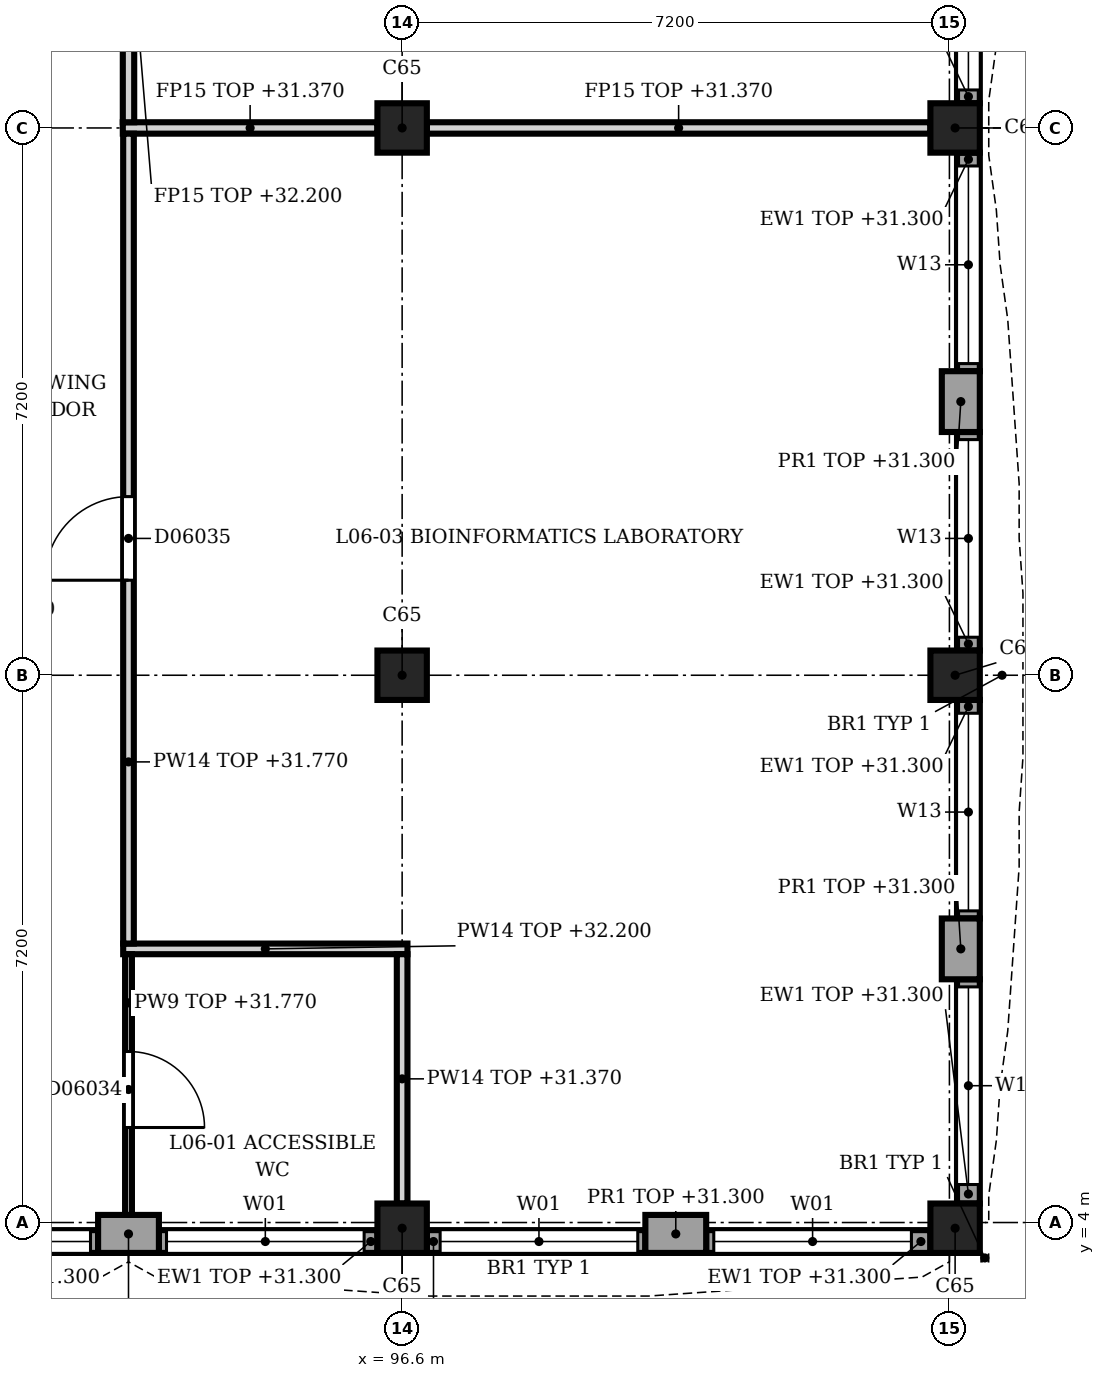
"""IFC4 building model, lengths in metres.
Left out: names, types, materials, properties, quantities, classifications, styles, units other than length and angle.
Written with IfcOpenShell. Run it as: python <this file> out.ifc"""

import sys

from ifc_helpers import new_model, si_unit, direction, frame, frame_2d, origin, origin_2d, place, context, subcontext, project, spatial, rectangle, extrude, element, fill, save


model = new_model("IFC4")
c1 = context("Model", 3, precision=1e-05, world=origin(), true_north=direction((0.0, 1.0)))
c2 = subcontext(c1, "Body", "Model", "MODEL_VIEW")
j1 = project(units=[si_unit("LENGTHUNIT", "METRE"), si_unit("PLANEANGLEUNIT", "RADIAN")], contexts=[c1])
p1 = place(None, origin())
s1 = spatial("IfcSite", under=j1, at=p1, CompositionType="ELEMENT")
p2 = place(p1, origin())
s2 = spatial("IfcBuilding", under=s1, at=p2, CompositionType="ELEMENT")
p3 = place(p2, frame((0.0, 0.0, 27.9)))
s3 = spatial("IfcBuildingStorey", under=s2, at=p3, CompositionType="ELEMENT", Elevation=27.9)
for number, where, z_axis, x_axis in (
    (1, (96.6, 3.925, 0.0), (0.0, 0.0, 1.0), (1.0, 0.0, 0.0)),
    (2, (96.6, 11.2, 0.0), (0.0, 0.0, 1.0), (1.0, 0.0, 0.0)),
    (3, (96.6, 18.4, 0.0), (0.0, 0.0, 1.0), (1.0, 0.0, 0.0)),
    (4, (103.875, 3.925, 0.0), (0.0, 0.0, 1.0), (1.0, 0.0, 0.0)),
    (5, (103.875, 11.2, 0.0), (0.0, 0.0, 1.0), (1.0, 0.0, 0.0)),
    (6, (103.875, 18.4, 0.0), (0.0, 0.0, 1.0), (1.0, 0.0, 0.0)),
):
    element("IfcColumn", number, at=place(p3, frame(where, z_axis=z_axis, x_axis=x_axis)), inside=s3, PredefinedType="COLUMN", context=c2, shape_type="SweptSolid", body=[
        extrude(rectangle(XDim=0.65, YDim=0.65, at=origin_2d()), origin(), (0.0, 0.0, 1.0), 4.5),
    ])
for number, where, z_axis, x_axis in (
    (7, (103.95, 15.2, 0.0), (0.0, 0.0, 1.0), (0.0, -1.0, 0.0)),
    (8, (103.95, 8.0, 0.0), (0.0, 0.0, 1.0), (0.0, -1.0, 0.0)),
):
    element("IfcWall", number, at=place(p3, frame(where, z_axis=z_axis, x_axis=x_axis)), inside=s3, PredefinedType="SOLIDWALL", context=c2, shape_type="SweptSolid", body=[
        extrude(rectangle(XDim=0.8, YDim=0.5, at=frame_2d((0.4, 0.0))), origin(), (0.0, 0.0, 1.0), 3.4),
    ])
p4 = place(p3, frame((104.05, 21.6, 0.0), z_axis=(0.0, 0.0, 1.0), x_axis=(0.0, -1.0, 0.0)))
e9 = element("IfcWall", 9, at=p4, inside=s3, PredefinedType="SOLIDWALL", context=c2, shape_type="SweptSolid", body=[
    extrude(rectangle(XDim=2.875, YDim=0.3, at=frame_2d((1.438, 0.0))), origin(), (0.0, 0.0, 1.0), 3.4),
])
p5 = place(p4, frame((0.1, 0.0, 0.9)))
e10 = element("IfcOpeningElement", 10, at=p5, cuts=e9, PredefinedType="OPENING", context=c2, shape_type="SweptSolid", body=[
    extrude(rectangle(XDim=2.6, YDim=2.2, at=frame_2d((1.3, 1.1))), frame((0.0, 0.16, 0.0), z_axis=(0.0, -1.0, 0.0), x_axis=(1.0, 0.0, 0.0)), (0.0, 0.0, 1.0), 0.32),
])
p6 = place(p3, frame((104.05, 18.075, 0.0), z_axis=(0.0, 0.0, 1.0), x_axis=(0.0, -1.0, 0.0)))
e11 = element("IfcWall", 11, at=p6, inside=s3, PredefinedType="SOLIDWALL", context=c2, shape_type="SweptSolid", body=[
    extrude(rectangle(XDim=2.875, YDim=0.3, at=frame_2d((1.438, 0.0))), origin(), (0.0, 0.0, 1.0), 3.4),
])
p7 = place(p6, frame((0.175, 0.0, 0.9)))
e12 = element("IfcOpeningElement", 12, at=p7, cuts=e11, PredefinedType="OPENING", context=c2, shape_type="SweptSolid", body=[
    extrude(rectangle(XDim=2.6, YDim=2.2, at=frame_2d((1.3, 1.1))), frame((0.0, 0.16, 0.0), z_axis=(0.0, -1.0, 0.0), x_axis=(1.0, 0.0, 0.0)), (0.0, 0.0, 1.0), 0.32),
])
p8 = place(p3, frame((104.05, 14.4, 0.0), z_axis=(0.0, 0.0, 1.0), x_axis=(0.0, -1.0, 0.0)))
e13 = element("IfcWall", 13, at=p8, inside=s3, PredefinedType="SOLIDWALL", context=c2, shape_type="SweptSolid", body=[
    extrude(rectangle(XDim=2.875, YDim=0.3, at=frame_2d((1.438, 0.0))), origin(), (0.0, 0.0, 1.0), 3.4),
])
p9 = place(p8, frame((0.1, 0.0, 0.9)))
e14 = element("IfcOpeningElement", 14, at=p9, cuts=e13, PredefinedType="OPENING", context=c2, shape_type="SweptSolid", body=[
    extrude(rectangle(XDim=2.6, YDim=2.2, at=frame_2d((1.3, 1.1))), frame((0.0, 0.16, 0.0), z_axis=(0.0, -1.0, 0.0), x_axis=(1.0, 0.0, 0.0)), (0.0, 0.0, 1.0), 0.32),
])
p10 = place(p3, frame((104.05, 10.875, 0.0), z_axis=(0.0, 0.0, 1.0), x_axis=(0.0, -1.0, 0.0)))
e15 = element("IfcWall", 15, at=p10, inside=s3, PredefinedType="SOLIDWALL", context=c2, shape_type="SweptSolid", body=[
    extrude(rectangle(XDim=2.875, YDim=0.3, at=frame_2d((1.438, 0.0))), origin(), (0.0, 0.0, 1.0), 3.4),
])
p11 = place(p10, frame((0.175, 0.0, 0.9)))
e16 = element("IfcOpeningElement", 16, at=p11, cuts=e15, PredefinedType="OPENING", context=c2, shape_type="SweptSolid", body=[
    extrude(rectangle(XDim=2.6, YDim=2.2, at=frame_2d((1.3, 1.1))), frame((0.0, 0.16, 0.0), z_axis=(0.0, -1.0, 0.0), x_axis=(1.0, 0.0, 0.0)), (0.0, 0.0, 1.0), 0.32),
])
p12 = place(p3, frame((104.05, 7.2, 0.0), z_axis=(0.0, 0.0, 1.0), x_axis=(0.0, -1.0, 0.0)))
e17 = element("IfcWall", 17, at=p12, inside=s3, PredefinedType="SOLIDWALL", context=c2, shape_type="SweptSolid", body=[
    extrude(rectangle(XDim=2.95, YDim=0.3, at=frame_2d((1.475, 0.0))), origin(), (0.0, 0.0, 1.0), 3.4),
])
p13 = place(p12, frame((0.1, 0.0, 0.9)))
e18 = element("IfcOpeningElement", 18, at=p13, cuts=e17, PredefinedType="OPENING", context=c2, shape_type="SweptSolid", body=[
    extrude(rectangle(XDim=2.6, YDim=2.2, at=frame_2d((1.3, 1.1))), frame((0.0, 0.16, 0.0), z_axis=(0.0, -1.0, 0.0), x_axis=(1.0, 0.0, 0.0)), (0.0, 0.0, 1.0), 0.32),
])
p14 = place(p3, frame((100.6, 3.85, 0.0), z_axis=(0.0, 0.0, 1.0), x_axis=(-1.0, 0.0, 0.0)))
e19 = element("IfcWall", 19, at=p14, inside=s3, PredefinedType="SOLIDWALL", context=c2, shape_type="SweptSolid", body=[
    extrude(rectangle(XDim=0.8, YDim=0.5, at=frame_2d((0.4, 0.0))), origin(), (0.0, 0.0, 1.0), 3.4),
])
p15 = place(p3, frame((93.4, 3.85, 0.0), z_axis=(0.0, 0.0, 1.0), x_axis=(-1.0, 0.0, 0.0)))
e20 = element("IfcWall", 20, at=p15, inside=s3, PredefinedType="SOLIDWALL", context=c2, shape_type="SweptSolid", body=[
    extrude(rectangle(XDim=0.8, YDim=0.5, at=frame_2d((0.4, 0.0))), origin(), (0.0, 0.0, 1.0), 3.4),
])
p16 = place(p3, frame((103.55, 3.75, 0.0), z_axis=(0.0, 0.0, 1.0), x_axis=(-1.0, 0.0, 0.0)))
e21 = element("IfcWall", 21, at=p16, inside=s3, PredefinedType="SOLIDWALL", context=c2, shape_type="SweptSolid", body=[
    extrude(rectangle(XDim=2.95, YDim=0.3, at=frame_2d((1.475, 0.0))), origin(), (0.0, 0.0, 1.0), 3.4),
])
p17 = place(p16, frame((0.25, 0.0, 0.9)))
e22 = element("IfcOpeningElement", 22, at=p17, cuts=e21, PredefinedType="OPENING", context=c2, shape_type="SweptSolid", body=[
    extrude(rectangle(XDim=2.6, YDim=2.4, at=frame_2d((1.3, 1.2))), frame((0.0, 0.16, 0.0), z_axis=(0.0, -1.0, 0.0), x_axis=(1.0, 0.0, 0.0)), (0.0, 0.0, 1.0), 0.32),
])
p18 = place(p3, frame((99.8, 3.75, 0.0), z_axis=(0.0, 0.0, 1.0), x_axis=(-1.0, 0.0, 0.0)))
e23 = element("IfcWall", 23, at=p18, inside=s3, PredefinedType="SOLIDWALL", context=c2, shape_type="SweptSolid", body=[
    extrude(rectangle(XDim=2.875, YDim=0.3, at=frame_2d((1.438, 0.0))), origin(), (0.0, 0.0, 1.0), 3.4),
])
p19 = place(p18, frame((0.1, 0.0, 0.9)))
e24 = element("IfcOpeningElement", 24, at=p19, cuts=e23, PredefinedType="OPENING", context=c2, shape_type="SweptSolid", body=[
    extrude(rectangle(XDim=2.6, YDim=2.4, at=frame_2d((1.3, 1.2))), frame((0.0, 0.16, 0.0), z_axis=(0.0, -1.0, 0.0), x_axis=(1.0, 0.0, 0.0)), (0.0, 0.0, 1.0), 0.32),
])
p20 = place(p3, frame((96.275, 3.75, 0.0), z_axis=(0.0, 0.0, 1.0), x_axis=(-1.0, 0.0, 0.0)))
e25 = element("IfcWall", 25, at=p20, inside=s3, PredefinedType="SOLIDWALL", context=c2, shape_type="SweptSolid", body=[
    extrude(rectangle(XDim=2.875, YDim=0.3, at=frame_2d((1.438, 0.0))), origin(), (0.0, 0.0, 1.0), 3.4),
])
p21 = place(p20, frame((0.175, 0.0, 0.9)))
e26 = element("IfcOpeningElement", 26, at=p21, cuts=e25, PredefinedType="OPENING", context=c2, shape_type="SweptSolid", body=[
    extrude(rectangle(XDim=2.6, YDim=2.4, at=frame_2d((1.3, 1.2))), frame((0.0, 0.16, 0.0), z_axis=(0.0, -1.0, 0.0), x_axis=(1.0, 0.0, 0.0)), (0.0, 0.0, 1.0), 0.32),
])
p22 = place(p3, frame((92.6, 3.75, 0.0), z_axis=(0.0, 0.0, 1.0), x_axis=(-1.0, 0.0, 0.0)))
e27 = element("IfcWall", 27, at=p22, inside=s3, PredefinedType="SOLIDWALL", context=c2, shape_type="SweptSolid", body=[
    extrude(rectangle(XDim=2.875, YDim=0.3, at=frame_2d((1.438, 0.0))), origin(), (0.0, 0.0, 1.0), 3.4),
])
p23 = place(p22, frame((0.1, 0.0, 0.9)))
e28 = element("IfcOpeningElement", 28, at=p23, cuts=e27, PredefinedType="OPENING", context=c2, shape_type="SweptSolid", body=[
    extrude(rectangle(XDim=2.6, YDim=2.4, at=frame_2d((1.3, 1.2))), frame((0.0, 0.16, 0.0), z_axis=(0.0, -1.0, 0.0), x_axis=(1.0, 0.0, 0.0)), (0.0, 0.0, 1.0), 0.32),
])
p24 = place(p3, frame((92.93, 7.6, 0.0), z_axis=(0.0, 0.0, 1.0), x_axis=(1.0, 0.0, 0.0)))
e29 = element("IfcWall", 29, at=p24, inside=s3, PredefinedType="PARTITIONING", context=c2, shape_type="SweptSolid", body=[
    extrude(rectangle(XDim=3.74, YDim=0.14, at=frame_2d((1.87, 0.0))), origin(), (0.0, 0.0, 1.0), 4.3),
])
p25 = place(p3, frame((92.925, 18.4, 0.0), z_axis=(0.0, 0.0, 1.0), x_axis=(1.0, 0.0, 0.0)))
e30 = element("IfcWall", 30, at=p25, inside=s3, PredefinedType="PARTITIONING", context=c2, shape_type="SweptSolid", body=[
    extrude(rectangle(XDim=3.35, YDim=0.15, at=frame_2d((1.675, 0.0))), origin(), (0.0, 0.0, 1.0), 3.47),
])
p26 = place(p3, frame((96.925, 18.4, 0.0), z_axis=(0.0, 0.0, 1.0), x_axis=(1.0, 0.0, 0.0)))
e31 = element("IfcWall", 31, at=p26, inside=s3, PredefinedType="PARTITIONING", context=c2, shape_type="SweptSolid", body=[
    extrude(rectangle(XDim=6.625, YDim=0.15, at=frame_2d((3.312, 0.0))), origin(), (0.0, 0.0, 1.0), 3.47),
])
p27 = place(p3, frame((93.0, 7.53, 0.0), z_axis=(0.0, 0.0, 1.0), x_axis=(0.0, -1.0, 0.0)))
e32 = element("IfcWall", 32, at=p27, inside=s3, PredefinedType="PARTITIONING", context=c2, shape_type="SweptSolid", body=[
    extrude(rectangle(XDim=3.43, YDim=0.09, at=frame_2d((1.715, 0.0))), origin(), (0.0, 0.0, 1.0), 3.87),
])
p28 = place(p27, frame((1.28, 0.0, 0.0)))
e33 = element("IfcOpeningElement", 33, at=p28, cuts=e32, PredefinedType="OPENING", context=c2, shape_type="SweptSolid", body=[
    extrude(rectangle(XDim=1.0, YDim=2.2, at=frame_2d((0.5, 1.1))), frame((0.0, 0.055, 0.0), z_axis=(0.0, -1.0, 0.0), x_axis=(1.0, 0.0, 0.0)), (0.0, 0.0, 1.0), 0.11),
])
p29 = place(p3, frame((93.0, 18.325, 0.0), z_axis=(0.0, 0.0, 1.0), x_axis=(0.0, -1.0, 0.0)))
e34 = element("IfcWall", 34, at=p29, inside=s3, PredefinedType="PARTITIONING", context=c2, shape_type="SweptSolid", body=[
    extrude(rectangle(XDim=10.655, YDim=0.14, at=frame_2d((5.328, 0.0))), origin(), (0.0, 0.0, 1.0), 3.87),
])
p30 = place(p29, frame((4.775, 0.0, 0.0)))
e35 = element("IfcOpeningElement", 35, at=p30, cuts=e34, PredefinedType="OPENING", context=c2, shape_type="SweptSolid", body=[
    extrude(rectangle(XDim=1.1, YDim=2.2, at=frame_2d((0.55, 1.1))), frame((0.0, 0.08, 0.0), z_axis=(0.0, -1.0, 0.0), x_axis=(1.0, 0.0, 0.0)), (0.0, 0.0, 1.0), 0.16),
])
p31 = place(p3, frame((93.0, 21.925, 0.0), z_axis=(0.0, 0.0, 1.0), x_axis=(0.0, -1.0, 0.0)))
e36 = element("IfcWall", 36, at=p31, inside=s3, PredefinedType="PARTITIONING", context=c2, shape_type="SweptSolid", body=[
    extrude(rectangle(XDim=3.45, YDim=0.15, at=frame_2d((1.725, 0.0))), origin(), (0.0, 0.0, 1.0), 4.3),
])
p32 = place(p31, frame((1.275, 0.0, 0.0)))
e37 = element("IfcOpeningElement", 37, at=p32, cuts=e36, PredefinedType="OPENING", context=c2, shape_type="SweptSolid", body=[
    extrude(rectangle(XDim=1.0, YDim=2.1, at=frame_2d((0.5, 1.05))), frame((0.0, 0.085, 0.0), z_axis=(0.0, -1.0, 0.0), x_axis=(1.0, 0.0, 0.0)), (0.0, 0.0, 1.0), 0.17),
])
p33 = place(p3, frame((96.6, 4.25, 0.0), z_axis=(0.0, 0.0, 1.0), x_axis=(0.0, 1.0, 0.0)))
e38 = element("IfcWall", 38, at=p33, inside=s3, PredefinedType="PARTITIONING", context=c2, shape_type="SweptSolid", body=[
    extrude(rectangle(XDim=3.28, YDim=0.14, at=frame_2d((1.64, 0.0))), origin(), (0.0, 0.0, 1.0), 3.47),
])
p34 = place(p5, origin())
e39 = element("IfcWindow", 39, at=p34, inside=s3, PartitioningType="SINGLE_PANEL", PredefinedType="WINDOW", context=c2, shape_type="SweptSolid", body=[
    extrude(rectangle(XDim=2.6, YDim=2.2, at=frame_2d((1.3, 1.1))), frame((0.0, 0.03, 0.0), z_axis=(0.0, -1.0, 0.0), x_axis=(1.0, 0.0, 0.0)), (0.0, 0.0, 1.0), 0.06),
])
fill(e10, e39)
p35 = place(p7, origin())
e40 = element("IfcWindow", 40, at=p35, inside=s3, PartitioningType="SINGLE_PANEL", PredefinedType="WINDOW", context=c2, shape_type="SweptSolid", body=[
    extrude(rectangle(XDim=2.6, YDim=2.2, at=frame_2d((1.3, 1.1))), frame((0.0, 0.03, 0.0), z_axis=(0.0, -1.0, 0.0), x_axis=(1.0, 0.0, 0.0)), (0.0, 0.0, 1.0), 0.06),
])
fill(e12, e40)
p36 = place(p9, origin())
e41 = element("IfcWindow", 41, at=p36, inside=s3, PartitioningType="SINGLE_PANEL", PredefinedType="WINDOW", context=c2, shape_type="SweptSolid", body=[
    extrude(rectangle(XDim=2.6, YDim=2.2, at=frame_2d((1.3, 1.1))), frame((0.0, 0.03, 0.0), z_axis=(0.0, -1.0, 0.0), x_axis=(1.0, 0.0, 0.0)), (0.0, 0.0, 1.0), 0.06),
])
fill(e14, e41)
p37 = place(p11, origin())
e42 = element("IfcWindow", 42, at=p37, inside=s3, PartitioningType="SINGLE_PANEL", PredefinedType="WINDOW", context=c2, shape_type="SweptSolid", body=[
    extrude(rectangle(XDim=2.6, YDim=2.2, at=frame_2d((1.3, 1.1))), frame((0.0, 0.03, 0.0), z_axis=(0.0, -1.0, 0.0), x_axis=(1.0, 0.0, 0.0)), (0.0, 0.0, 1.0), 0.06),
])
fill(e16, e42)
p38 = place(p13, origin())
e43 = element("IfcWindow", 43, at=p38, inside=s3, PartitioningType="SINGLE_PANEL", PredefinedType="WINDOW", context=c2, shape_type="SweptSolid", body=[
    extrude(rectangle(XDim=2.6, YDim=2.2, at=frame_2d((1.3, 1.1))), frame((0.0, 0.03, 0.0), z_axis=(0.0, -1.0, 0.0), x_axis=(1.0, 0.0, 0.0)), (0.0, 0.0, 1.0), 0.06),
])
fill(e18, e43)
p39 = place(p17, origin())
e44 = element("IfcWindow", 44, at=p39, inside=s3, PartitioningType="SINGLE_PANEL", PredefinedType="WINDOW", context=c2, shape_type="SweptSolid", body=[
    extrude(rectangle(XDim=2.6, YDim=2.4, at=frame_2d((1.3, 1.2))), frame((0.0, 0.03, 0.0), z_axis=(0.0, -1.0, 0.0), x_axis=(1.0, 0.0, 0.0)), (0.0, 0.0, 1.0), 0.06),
])
fill(e22, e44)
p40 = place(p19, origin())
e45 = element("IfcWindow", 45, at=p40, inside=s3, PartitioningType="SINGLE_PANEL", PredefinedType="WINDOW", context=c2, shape_type="SweptSolid", body=[
    extrude(rectangle(XDim=2.6, YDim=2.4, at=frame_2d((1.3, 1.2))), frame((0.0, 0.03, 0.0), z_axis=(0.0, -1.0, 0.0), x_axis=(1.0, 0.0, 0.0)), (0.0, 0.0, 1.0), 0.06),
])
fill(e24, e45)
p41 = place(p21, origin())
e46 = element("IfcWindow", 46, at=p41, inside=s3, PartitioningType="SINGLE_PANEL", PredefinedType="WINDOW", context=c2, shape_type="SweptSolid", body=[
    extrude(rectangle(XDim=2.6, YDim=2.4, at=frame_2d((1.3, 1.2))), frame((0.0, 0.03, 0.0), z_axis=(0.0, -1.0, 0.0), x_axis=(1.0, 0.0, 0.0)), (0.0, 0.0, 1.0), 0.06),
])
fill(e26, e46)
p42 = place(p23, origin())
e47 = element("IfcWindow", 47, at=p42, inside=s3, PartitioningType="SINGLE_PANEL", PredefinedType="WINDOW", context=c2, shape_type="SweptSolid", body=[
    extrude(rectangle(XDim=2.6, YDim=2.4, at=frame_2d((1.3, 1.2))), frame((0.0, 0.03, 0.0), z_axis=(0.0, -1.0, 0.0), x_axis=(1.0, 0.0, 0.0)), (0.0, 0.0, 1.0), 0.06),
])
fill(e28, e47)
p43 = place(p28, origin())
e48 = element("IfcDoor", 48, at=p43, inside=s3, OperationType="SINGLE_SWING_RIGHT", PredefinedType="DOOR", context=c2, shape_type="SweptSolid", body=[
    extrude(rectangle(XDim=1.0, YDim=2.2, at=frame_2d((0.5, 1.1))), frame((0.0, 0.025, 0.0), z_axis=(0.0, -1.0, 0.0), x_axis=(1.0, 0.0, 0.0)), (0.0, 0.0, 1.0), 0.05),
])
fill(e33, e48)
p44 = place(p30, origin())
e49 = element("IfcDoor", 49, at=p44, inside=s3, OperationType="SINGLE_SWING_LEFT", PredefinedType="DOOR", context=c2, shape_type="SweptSolid", body=[
    extrude(rectangle(XDim=1.1, YDim=2.2, at=frame_2d((0.55, 1.1))), frame((0.0, 0.025, 0.0), z_axis=(0.0, -1.0, 0.0), x_axis=(1.0, 0.0, 0.0)), (0.0, 0.0, 1.0), 0.05),
])
fill(e35, e49)
save(model, sys.argv[1])
